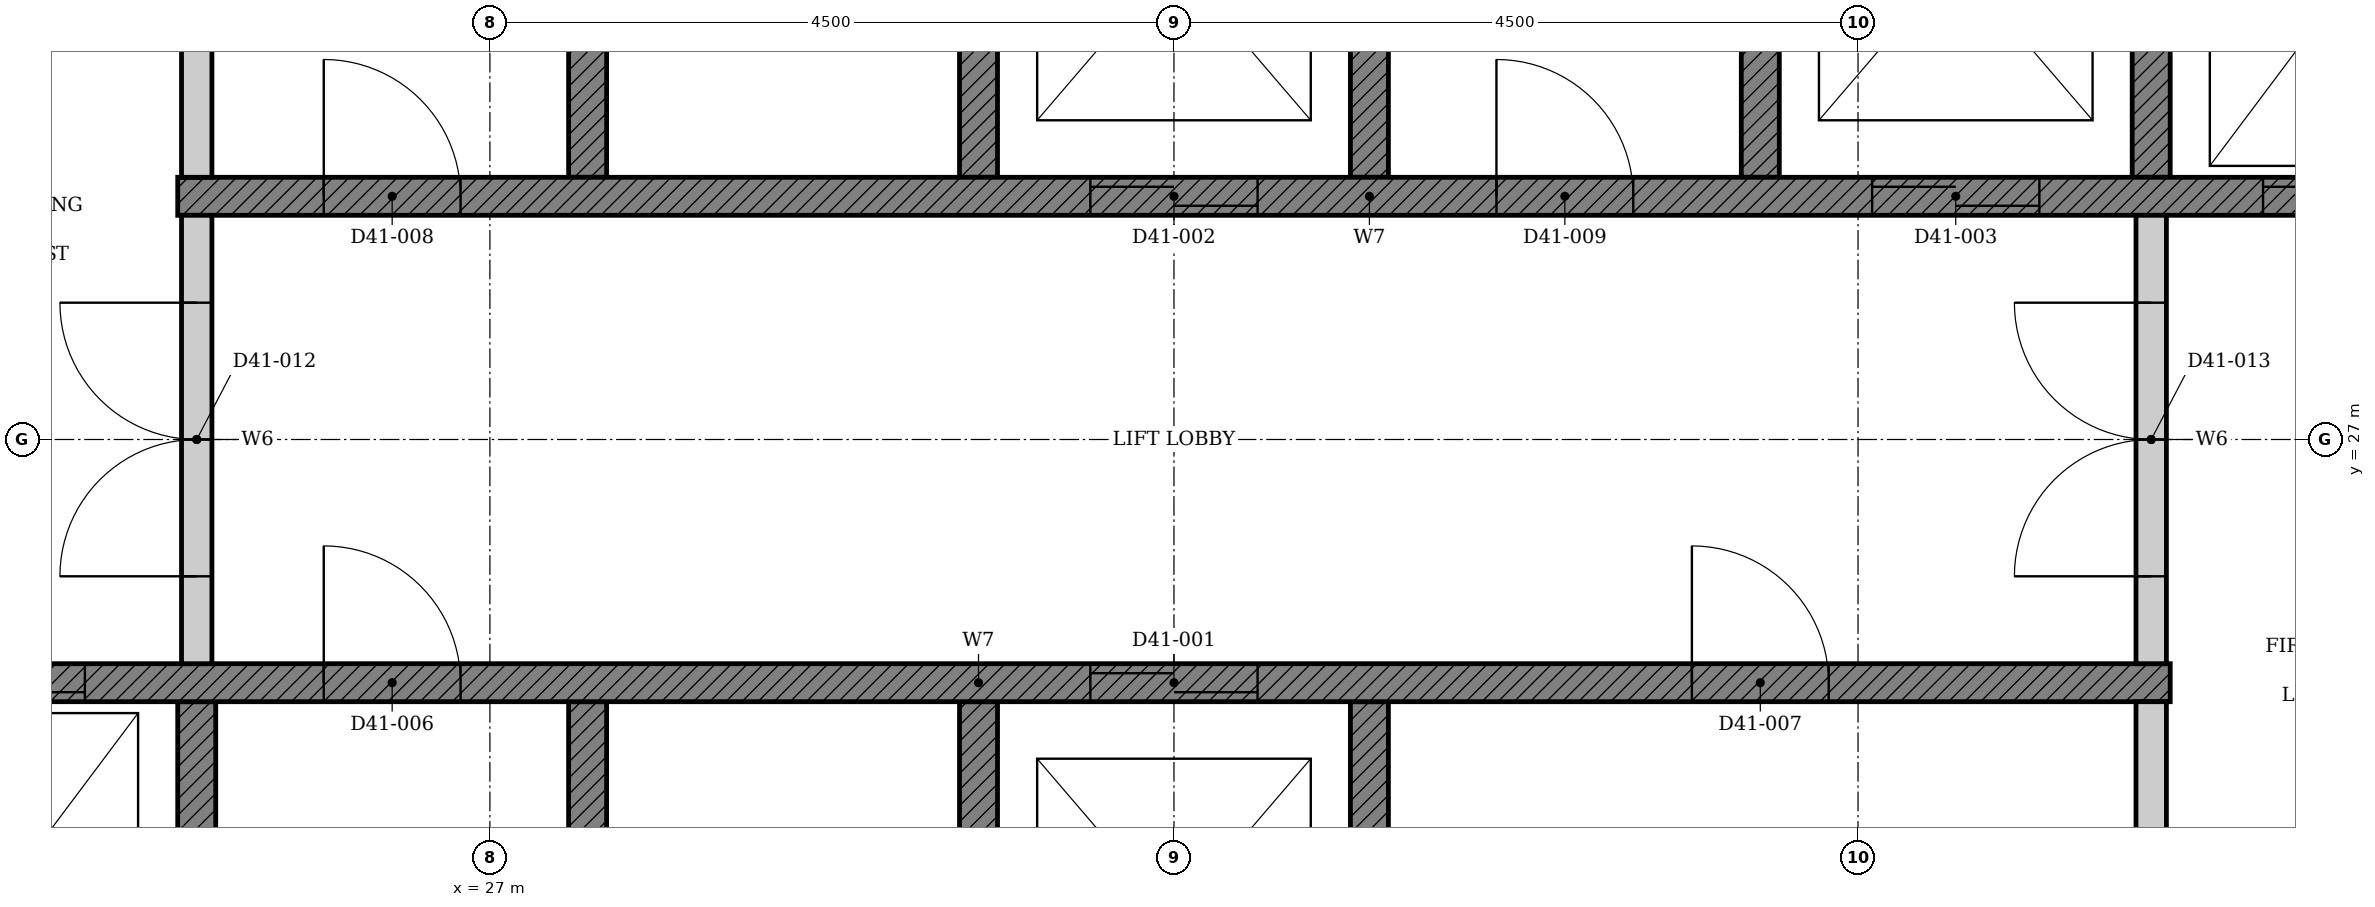
"""IFC4 building model, lengths in metres.
Left out: names, types, materials, properties, quantities, classifications, styles, units other than length and angle.
Written with IfcOpenShell. Run it as: python <this file> out.ifc"""

import sys

from ifc_helpers import new_model, si_unit, direction, frame, frame_2d, origin, place, context, subcontext, project, spatial, polyline, rectangle, outline, extrude, element, fill, save


model = new_model("IFC4")
c1 = context("Model", 3, precision=1e-05, world=origin(), true_north=direction((0.0, 1.0)))
c2 = subcontext(c1, "Body", "Model", "MODEL_VIEW")
j1 = project(units=[si_unit("LENGTHUNIT", "METRE"), si_unit("PLANEANGLEUNIT", "RADIAN")], contexts=[c1])
p1 = place(None, origin())
s1 = spatial("IfcSite", under=j1, at=p1, CompositionType="ELEMENT")
p2 = place(p1, origin())
s2 = spatial("IfcBuilding", under=s1, at=p2, CompositionType="ELEMENT")
p3 = place(p2, frame((0.0, 0.0, 165.4)))
s3 = spatial("IfcBuildingStorey", under=s2, at=p3, CompositionType="ELEMENT", Elevation=165.4)
p4 = place(p3, origin())
e1 = element("IfcWall", 1, at=p4, inside=s3, PredefinedType="SHEAR", context=c2, shape_type="SweptSolid", body=[
    extrude(outline(polyline([(22.375, 22.35), (25.197, 22.35), (25.197, 25.275), (24.947, 25.275), (24.947, 22.65), (22.625, 22.65), (22.625, 25.275), (22.375, 25.275), (22.375, 22.35)])), origin(), (0.0, 0.0, 1.0), 3.4),
])
p5 = place(p3, origin())
e2 = element("IfcWall", 2, at=p5, inside=s3, PredefinedType="SHEAR", context=c2, shape_type="SweptSolid", body=[
    extrude(outline(polyline([(27.518, 22.35), (32.911, 22.35), (32.911, 25.275), (32.661, 25.275), (32.661, 22.65), (30.339, 22.65), (30.339, 25.275), (30.089, 25.275), (30.089, 22.65), (27.768, 22.65), (27.768, 25.275), (27.518, 25.275), (27.518, 22.35)])), origin(), (0.0, 0.0, 1.0), 3.4),
])
p6 = place(p3, origin())
e3 = element("IfcWall", 3, at=p6, inside=s3, PredefinedType="SHEAR", context=c2, shape_type="SweptSolid", body=[
    extrude(outline(polyline([(27.518, 28.725), (27.768, 28.725), (27.768, 31.35), (30.089, 31.35), (30.089, 28.725), (30.339, 28.725), (30.339, 31.35), (32.661, 31.35), (32.661, 28.725), (32.911, 28.725), (32.911, 31.65), (27.518, 31.65), (27.518, 28.725)])), origin(), (0.0, 0.0, 1.0), 3.4),
])
p7 = place(p3, origin())
e4 = element("IfcWall", 4, at=p7, inside=s3, PredefinedType="SHEAR", context=c2, shape_type="SweptSolid", body=[
    extrude(outline(polyline([(35.232, 28.725), (35.482, 28.725), (35.482, 31.35), (37.803, 31.35), (37.803, 28.725), (38.053, 28.725), (38.053, 31.35), (40.375, 31.35), (40.375, 28.725), (40.625, 28.725), (40.625, 31.65), (35.232, 31.65), (35.232, 28.725)])), origin(), (0.0, 0.0, 1.0), 3.4),
])
p8 = place(p3, frame((22.375, 25.4, 0.0), z_axis=(0.0, 0.0, 1.0), x_axis=(1.0, 0.0, 0.0)))
e5 = element("IfcWall", 5, at=p8, inside=s3, PredefinedType="SHEAR", context=c2, shape_type="SweptSolid", body=[
    extrude(rectangle(XDim=15.678, YDim=0.25, at=frame_2d((7.839, 0.0))), origin(), (0.0, 0.0, 1.0), 3.4),
])
p9 = place(p8, frame((8.575, 0.0, 0.0)))
e6 = element("IfcOpeningElement", 6, at=p9, cuts=e5, PredefinedType="OPENING", context=c2, shape_type="SweptSolid", body=[
    extrude(rectangle(XDim=1.1, YDim=2.1, at=frame_2d((0.55, 1.05))), frame((0.0, 0.135, 0.0), z_axis=(0.0, -1.0, 0.0), x_axis=(1.0, 0.0, 0.0)), (0.0, 0.0, 1.0), 0.27),
])
p10 = place(p8, frame((0.861, 0.0, 0.0)))
e7 = element("IfcOpeningElement", 7, at=p10, cuts=e5, PredefinedType="OPENING", context=c2, shape_type="SweptSolid", body=[
    extrude(rectangle(XDim=1.1, YDim=2.1, at=frame_2d((0.55, 1.05))), frame((0.0, 0.135, 0.0), z_axis=(0.0, -1.0, 0.0), x_axis=(1.0, 0.0, 0.0)), (0.0, 0.0, 1.0), 0.27),
])
p11 = place(p8, frame((3.532, 0.0, 0.0)))
e8 = element("IfcOpeningElement", 8, at=p11, cuts=e5, PredefinedType="OPENING", context=c2, shape_type="SweptSolid", body=[
    extrude(rectangle(XDim=0.9, YDim=2.1, at=frame_2d((0.45, 1.05))), frame((0.0, 0.135, 0.0), z_axis=(0.0, -1.0, 0.0), x_axis=(1.0, 0.0, 0.0)), (0.0, 0.0, 1.0), 0.27),
])
p12 = place(p8, frame((12.532, 0.0, 0.0)))
e9 = element("IfcOpeningElement", 9, at=p12, cuts=e5, PredefinedType="OPENING", context=c2, shape_type="SweptSolid", body=[
    extrude(rectangle(XDim=0.9, YDim=2.1, at=frame_2d((0.45, 1.05))), frame((0.0, 0.135, 0.0), z_axis=(0.0, -1.0, 0.0), x_axis=(1.0, 0.0, 0.0)), (0.0, 0.0, 1.0), 0.27),
])
p13 = place(p3, frame((24.947, 28.6, 0.0), z_axis=(0.0, 0.0, 1.0), x_axis=(1.0, 0.0, 0.0)))
e10 = element("IfcWall", 10, at=p13, inside=s3, PredefinedType="SHEAR", context=c2, shape_type="SweptSolid", body=[
    extrude(rectangle(XDim=15.678, YDim=0.25, at=frame_2d((7.839, 0.0))), origin(), (0.0, 0.0, 1.0), 3.4),
])
p14 = place(p13, frame((6.004, 0.0, 0.0)))
e11 = element("IfcOpeningElement", 11, at=p14, cuts=e10, PredefinedType="OPENING", context=c2, shape_type="SweptSolid", body=[
    extrude(rectangle(XDim=1.1, YDim=2.1, at=frame_2d((0.55, 1.05))), frame((0.0, 0.135, 0.0), z_axis=(0.0, -1.0, 0.0), x_axis=(1.0, 0.0, 0.0)), (0.0, 0.0, 1.0), 0.27),
])
p15 = place(p13, frame((11.146, 0.0, 0.0)))
e12 = element("IfcOpeningElement", 12, at=p15, cuts=e10, PredefinedType="OPENING", context=c2, shape_type="SweptSolid", body=[
    extrude(rectangle(XDim=1.1, YDim=2.1, at=frame_2d((0.55, 1.05))), frame((0.0, 0.135, 0.0), z_axis=(0.0, -1.0, 0.0), x_axis=(1.0, 0.0, 0.0)), (0.0, 0.0, 1.0), 0.27),
])
p16 = place(p13, frame((13.718, 0.0, 0.0)))
e13 = element("IfcOpeningElement", 13, at=p16, cuts=e10, PredefinedType="OPENING", context=c2, shape_type="SweptSolid", body=[
    extrude(rectangle(XDim=1.1, YDim=2.1, at=frame_2d((0.55, 1.05))), frame((0.0, 0.135, 0.0), z_axis=(0.0, -1.0, 0.0), x_axis=(1.0, 0.0, 0.0)), (0.0, 0.0, 1.0), 0.27),
])
p17 = place(p13, frame((0.961, 0.0, 0.0)))
e14 = element("IfcOpeningElement", 14, at=p17, cuts=e10, PredefinedType="OPENING", context=c2, shape_type="SweptSolid", body=[
    extrude(rectangle(XDim=0.9, YDim=2.1, at=frame_2d((0.45, 1.05))), frame((0.0, 0.135, 0.0), z_axis=(0.0, -1.0, 0.0), x_axis=(1.0, 0.0, 0.0)), (0.0, 0.0, 1.0), 0.27),
])
p18 = place(p13, frame((8.675, 0.0, 0.0)))
e15 = element("IfcOpeningElement", 15, at=p18, cuts=e10, PredefinedType="OPENING", context=c2, shape_type="SweptSolid", body=[
    extrude(rectangle(XDim=0.9, YDim=2.1, at=frame_2d((0.45, 1.05))), frame((0.0, 0.135, 0.0), z_axis=(0.0, -1.0, 0.0), x_axis=(1.0, 0.0, 0.0)), (0.0, 0.0, 1.0), 0.27),
])
for number, where, z_axis, x_axis in (
    (16, (37.928, 22.65, 0.0), (0.0, 0.0, 1.0), (0.0, 1.0, 0.0)),
    (17, (25.072, 28.725, 0.0), (0.0, 0.0, 1.0), (0.0, 1.0, 0.0)),
):
    element("IfcWall", number, at=place(p3, frame(where, z_axis=z_axis, x_axis=x_axis)), inside=s3, PredefinedType="PARTITIONING", context=c2, shape_type="SweptSolid", body=[
        extrude(rectangle(XDim=2.625, YDim=0.2, at=frame_2d((1.312, 0.0))), origin(), (0.0, 0.0, 1.0), 3.4),
    ])
p19 = place(p3, frame((25.072, 25.525, 0.0), z_axis=(0.0, 0.0, 1.0), x_axis=(0.0, 1.0, 0.0)))
e18 = element("IfcWall", 18, at=p19, inside=s3, PredefinedType="PARTITIONING", context=c2, shape_type="SweptSolid", body=[
    extrude(rectangle(XDim=2.95, YDim=0.2, at=frame_2d((1.475, 0.0))), origin(), (0.0, 0.0, 1.0), 3.4),
])
p20 = place(p19, frame((0.575, 0.0, 0.0)))
e19 = element("IfcOpeningElement", 19, at=p20, cuts=e18, PredefinedType="OPENING", context=c2, shape_type="SweptSolid", body=[
    extrude(rectangle(XDim=1.8, YDim=2.1, at=frame_2d((0.9, 1.05))), frame((0.0, 0.11, 0.0), z_axis=(0.0, -1.0, 0.0), x_axis=(1.0, 0.0, 0.0)), (0.0, 0.0, 1.0), 0.22),
])
p21 = place(p3, frame((37.928, 25.525, 0.0), z_axis=(0.0, 0.0, 1.0), x_axis=(0.0, 1.0, 0.0)))
e20 = element("IfcWall", 20, at=p21, inside=s3, PredefinedType="PARTITIONING", context=c2, shape_type="SweptSolid", body=[
    extrude(rectangle(XDim=2.95, YDim=0.2, at=frame_2d((1.475, 0.0))), origin(), (0.0, 0.0, 1.0), 3.4),
])
p22 = place(p21, frame((0.575, 0.0, 0.0)))
e21 = element("IfcOpeningElement", 21, at=p22, cuts=e20, PredefinedType="OPENING", context=c2, shape_type="SweptSolid", body=[
    extrude(rectangle(XDim=1.8, YDim=2.1, at=frame_2d((0.9, 1.05))), frame((0.0, 0.11, 0.0), z_axis=(0.0, -1.0, 0.0), x_axis=(1.0, 0.0, 0.0)), (0.0, 0.0, 1.0), 0.22),
])
p23 = place(p9, origin())
e22 = element("IfcDoor", 22, at=p23, inside=s3, OperationType="DOUBLE_DOOR_SLIDING", PredefinedType="DOOR", context=c2, shape_type="SweptSolid", body=[
    extrude(rectangle(XDim=1.1, YDim=2.1, at=frame_2d((0.55, 1.05))), frame((0.0, 0.025, 0.0), z_axis=(0.0, -1.0, 0.0), x_axis=(1.0, 0.0, 0.0)), (0.0, 0.0, 1.0), 0.05),
])
fill(e6, e22)
p24 = place(p14, origin())
e23 = element("IfcDoor", 23, at=p24, inside=s3, OperationType="DOUBLE_DOOR_SLIDING", PredefinedType="DOOR", context=c2, shape_type="SweptSolid", body=[
    extrude(rectangle(XDim=1.1, YDim=2.1, at=frame_2d((0.55, 1.05))), frame((0.0, 0.025, 0.0), z_axis=(0.0, -1.0, 0.0), x_axis=(1.0, 0.0, 0.0)), (0.0, 0.0, 1.0), 0.05),
])
fill(e11, e23)
p25 = place(p15, origin())
e24 = element("IfcDoor", 24, at=p25, inside=s3, OperationType="DOUBLE_DOOR_SLIDING", PredefinedType="DOOR", context=c2, shape_type="SweptSolid", body=[
    extrude(rectangle(XDim=1.1, YDim=2.1, at=frame_2d((0.55, 1.05))), frame((0.0, 0.025, 0.0), z_axis=(0.0, -1.0, 0.0), x_axis=(1.0, 0.0, 0.0)), (0.0, 0.0, 1.0), 0.05),
])
fill(e12, e24)
p26 = place(p10, origin())
e25 = element("IfcDoor", 25, at=p26, inside=s3, OperationType="DOUBLE_DOOR_SLIDING", PredefinedType="DOOR", context=c2, shape_type="SweptSolid", body=[
    extrude(rectangle(XDim=1.1, YDim=2.1, at=frame_2d((0.55, 1.05))), frame((0.0, 0.025, 0.0), z_axis=(0.0, -1.0, 0.0), x_axis=(1.0, 0.0, 0.0)), (0.0, 0.0, 1.0), 0.05),
])
fill(e7, e25)
p27 = place(p16, origin())
e26 = element("IfcDoor", 26, at=p27, inside=s3, OperationType="DOUBLE_DOOR_SLIDING", PredefinedType="DOOR", context=c2, shape_type="SweptSolid", body=[
    extrude(rectangle(XDim=1.1, YDim=2.1, at=frame_2d((0.55, 1.05))), frame((0.0, 0.025, 0.0), z_axis=(0.0, -1.0, 0.0), x_axis=(1.0, 0.0, 0.0)), (0.0, 0.0, 1.0), 0.05),
])
fill(e13, e26)
p28 = place(p11, origin())
e27 = element("IfcDoor", 27, at=p28, inside=s3, OperationType="SINGLE_SWING_LEFT", PredefinedType="DOOR", context=c2, shape_type="SweptSolid", body=[
    extrude(rectangle(XDim=0.9, YDim=2.1, at=frame_2d((0.45, 1.05))), frame((0.0, 0.025, 0.0), z_axis=(0.0, -1.0, 0.0), x_axis=(1.0, 0.0, 0.0)), (0.0, 0.0, 1.0), 0.05),
])
fill(e8, e27)
p29 = place(p12, origin())
e28 = element("IfcDoor", 28, at=p29, inside=s3, OperationType="SINGLE_SWING_LEFT", PredefinedType="DOOR", context=c2, shape_type="SweptSolid", body=[
    extrude(rectangle(XDim=0.9, YDim=2.1, at=frame_2d((0.45, 1.05))), frame((0.0, 0.025, 0.0), z_axis=(0.0, -1.0, 0.0), x_axis=(1.0, 0.0, 0.0)), (0.0, 0.0, 1.0), 0.05),
])
fill(e9, e28)
p30 = place(p17, origin())
e29 = element("IfcDoor", 29, at=p30, inside=s3, OperationType="SINGLE_SWING_LEFT", PredefinedType="DOOR", context=c2, shape_type="SweptSolid", body=[
    extrude(rectangle(XDim=0.9, YDim=2.1, at=frame_2d((0.45, 1.05))), frame((0.0, 0.025, 0.0), z_axis=(0.0, -1.0, 0.0), x_axis=(1.0, 0.0, 0.0)), (0.0, 0.0, 1.0), 0.05),
])
fill(e14, e29)
p31 = place(p18, origin())
e30 = element("IfcDoor", 30, at=p31, inside=s3, OperationType="SINGLE_SWING_LEFT", PredefinedType="DOOR", context=c2, shape_type="SweptSolid", body=[
    extrude(rectangle(XDim=0.9, YDim=2.1, at=frame_2d((0.45, 1.05))), frame((0.0, 0.025, 0.0), z_axis=(0.0, -1.0, 0.0), x_axis=(1.0, 0.0, 0.0)), (0.0, 0.0, 1.0), 0.05),
])
fill(e15, e30)
p32 = place(p20, origin())
e31 = element("IfcDoor", 31, at=p32, inside=s3, OperationType="DOUBLE_DOOR_SINGLE_SWING", PredefinedType="DOOR", context=c2, shape_type="SweptSolid", body=[
    extrude(rectangle(XDim=1.8, YDim=2.1, at=frame_2d((0.9, 1.05))), frame((0.0, 0.025, 0.0), z_axis=(0.0, -1.0, 0.0), x_axis=(1.0, 0.0, 0.0)), (0.0, 0.0, 1.0), 0.05),
])
fill(e19, e31)
p33 = place(p22, origin())
e32 = element("IfcDoor", 32, at=p33, inside=s3, OperationType="DOUBLE_DOOR_SINGLE_SWING", PredefinedType="DOOR", context=c2, shape_type="SweptSolid", body=[
    extrude(rectangle(XDim=1.8, YDim=2.1, at=frame_2d((0.9, 1.05))), frame((0.0, 0.025, 0.0), z_axis=(0.0, -1.0, 0.0), x_axis=(1.0, 0.0, 0.0)), (0.0, 0.0, 1.0), 0.05),
])
fill(e21, e32)
save(model, sys.argv[1])
